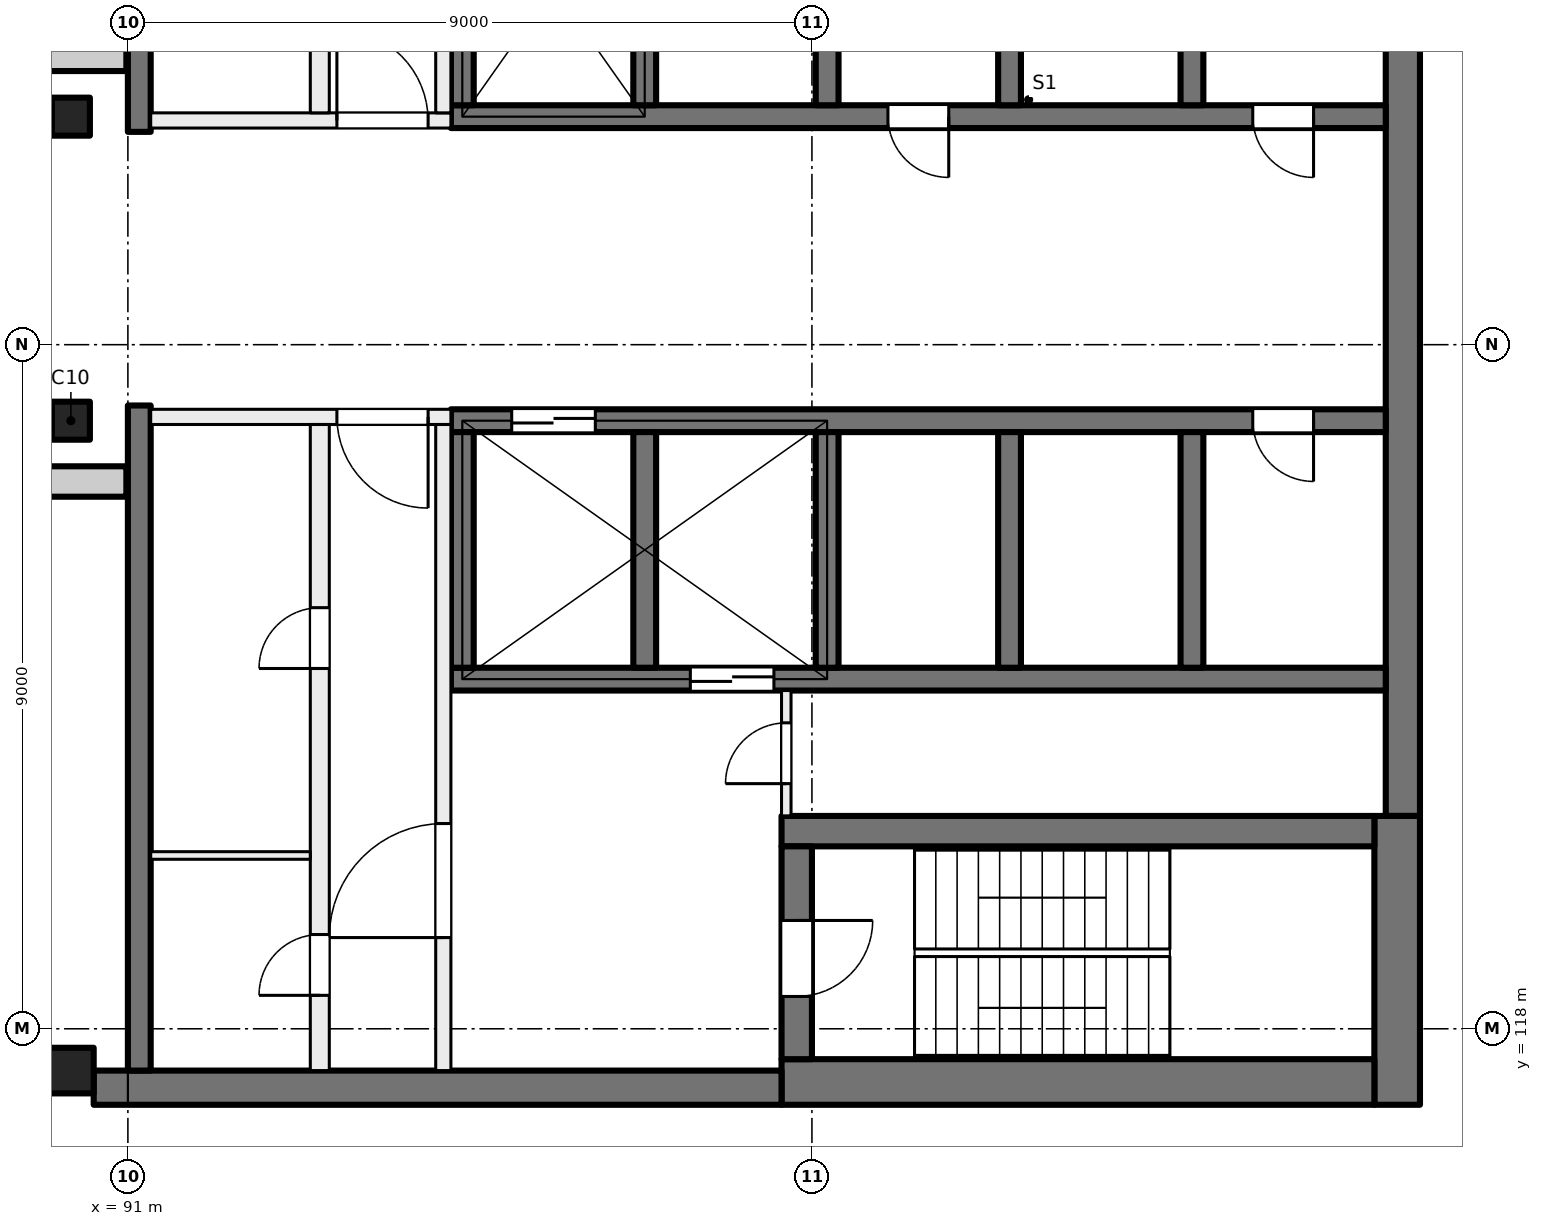
"""IFC4 building model, lengths in metres.
Left out: names, types, materials, properties, quantities, classifications, styles, units other than length and angle.
Written with IfcOpenShell. Run it as: python <this file> out.ifc"""

import sys

from ifc_helpers import new_model, si_unit, direction, frame, frame_2d, origin, origin_2d, place, context, subcontext, project, spatial, rectangle, extrude, element, fill, save


model = new_model("IFC4")
c1 = context("Model", 3, precision=1e-05, world=origin(), true_north=direction((0.0, 1.0)))
c2 = subcontext(c1, "Body", "Model", "MODEL_VIEW")
j1 = project(units=[si_unit("LENGTHUNIT", "METRE"), si_unit("PLANEANGLEUNIT", "RADIAN")], contexts=[c1])
p1 = place(None, origin())
s1 = spatial("IfcSite", under=j1, at=p1, CompositionType="ELEMENT")
p2 = place(p1, origin())
s2 = spatial("IfcBuilding", under=s1, at=p2, CompositionType="ELEMENT")
p3 = place(p2, frame((0.0, 0.0, 291.0)))
s3 = spatial("IfcBuildingStorey", under=s2, at=p3, CompositionType="ELEMENT", Elevation=291.0)
for number, where, z_axis, x_axis in (
    (1, (90.25, 130.0, 0.0), (0.0, 0.0, 1.0), (1.0, 0.0, 0.0)),
    (2, (90.25, 126.0, 0.0), (0.0, 0.0, 1.0), (1.0, 0.0, 0.0)),
):
    element("IfcColumn", number, at=place(p3, frame(where, z_axis=z_axis, x_axis=x_axis)), inside=s3, PredefinedType="COLUMN", context=c2, shape_type="SweptSolid", body=[
        extrude(rectangle(XDim=0.5, YDim=0.5, at=origin_2d()), origin(), (0.0, 0.0, 1.0), 4.5),
    ])
p4 = place(p3, frame((90.25, 117.45, 0.0), z_axis=(0.0, 0.0, 1.0), x_axis=(1.0, 0.0, 0.0)))
e3 = element("IfcColumn", 3, at=p4, inside=s3, PredefinedType="COLUMN", context=c2, shape_type="SweptSolid", body=[
    extrude(rectangle(XDim=0.6, YDim=0.6, at=origin_2d()), origin(), (0.0, 0.0, 1.0), 4.5),
])
p5 = place(p3, frame((107.775, 135.2, 0.0), z_axis=(0.0, 0.0, 1.0), x_axis=(0.0, -1.0, 0.0)))
e4 = element("IfcWall", 4, at=p5, inside=s3, PredefinedType="SHEAR", context=c2, shape_type="SweptSolid", body=[
    extrude(rectangle(XDim=14.4, YDim=0.45, at=frame_2d((7.2, 0.0))), origin(), (0.0, 0.0, 1.0), 4.5),
])
p6 = place(p3, frame((107.7, 120.8, 0.0), z_axis=(0.0, 0.0, 1.0), x_axis=(0.0, -1.0, 0.0)))
e5 = element("IfcWall", 5, at=p6, inside=s3, PredefinedType="SHEAR", context=c2, shape_type="SweptSolid", body=[
    extrude(rectangle(XDim=3.8, YDim=0.6, at=frame_2d((1.9, 0.0))), origin(), (0.0, 0.0, 1.0), 4.5),
])
p7 = place(p3, frame((107.4, 117.3, 0.0), z_axis=(0.0, 0.0, 1.0), x_axis=(-1.0, 0.0, 0.0)))
e6 = element("IfcWall", 6, at=p7, inside=s3, PredefinedType="SHEAR", context=c2, shape_type="SweptSolid", body=[
    extrude(rectangle(XDim=7.8, YDim=0.6, at=frame_2d((3.9, 0.0))), origin(), (0.0, 0.0, 1.0), 4.5),
])
p8 = place(p3, frame((99.6, 117.225, 0.0), z_axis=(0.0, 0.0, 1.0), x_axis=(-1.0, 0.0, 0.0)))
e7 = element("IfcWall", 7, at=p8, inside=s3, PredefinedType="SHEAR", context=c2, shape_type="SweptSolid", body=[
    extrude(rectangle(XDim=9.05, YDim=0.45, at=frame_2d((4.525, 0.0))), origin(), (0.0, 0.0, 1.0), 4.5),
])
p9 = place(p3, frame((107.4, 120.6, 0.0), z_axis=(0.0, 0.0, 1.0), x_axis=(-1.0, 0.0, 0.0)))
e8 = element("IfcWall", 8, at=p9, inside=s3, PredefinedType="SHEAR", context=c2, shape_type="SweptSolid", body=[
    extrude(rectangle(XDim=7.8, YDim=0.4, at=frame_2d((3.9, 0.0))), origin(), (0.0, 0.0, 1.0), 4.5),
])
p10 = place(p3, frame((99.8, 120.4, 0.0), z_axis=(0.0, 0.0, 1.0), x_axis=(0.0, -1.0, 0.0)))
e9 = element("IfcWall", 9, at=p10, inside=s3, PredefinedType="SHEAR", context=c2, shape_type="SweptSolid", body=[
    extrude(rectangle(XDim=2.8, YDim=0.4, at=frame_2d((1.4, 0.0))), origin(), (0.0, 0.0, 1.0), 4.5),
])
p11 = place(p10, frame((0.975, 0.0, 0.0)))
e10 = element("IfcOpeningElement", 10, at=p11, cuts=e9, PredefinedType="OPENING", context=c2, shape_type="SweptSolid", body=[
    extrude(rectangle(XDim=1.0, YDim=2.1, at=frame_2d((0.5, 1.05))), frame((0.0, 0.21, 0.0), z_axis=(0.0, -1.0, 0.0), x_axis=(1.0, 0.0, 0.0)), (0.0, 0.0, 1.0), 0.42),
])
p12 = place(p3, frame((107.55, 130.0, 0.0), z_axis=(0.0, 0.0, 1.0), x_axis=(-1.0, 0.0, 0.0)))
e11 = element("IfcWall", 11, at=p12, inside=s3, PredefinedType="SHEAR", context=c2, shape_type="SweptSolid", body=[
    extrude(rectangle(XDim=12.3, YDim=0.3, at=frame_2d((6.15, 0.0))), origin(), (0.0, 0.0, 1.0), 4.5),
])
p13 = place(p12, frame((0.95, 0.0, 0.0)))
e12 = element("IfcOpeningElement", 12, at=p13, cuts=e11, PredefinedType="OPENING", context=c2, shape_type="SweptSolid", body=[
    extrude(rectangle(XDim=0.8, YDim=2.1, at=frame_2d((0.4, 1.05))), frame((0.0, 0.16, 0.0), z_axis=(0.0, -1.0, 0.0), x_axis=(1.0, 0.0, 0.0)), (0.0, 0.0, 1.0), 0.32),
])
p14 = place(p12, frame((5.75, 0.0, 0.0)))
e13 = element("IfcOpeningElement", 13, at=p14, cuts=e11, PredefinedType="OPENING", context=c2, shape_type="SweptSolid", body=[
    extrude(rectangle(XDim=0.8, YDim=2.1, at=frame_2d((0.4, 1.05))), frame((0.0, 0.16, 0.0), z_axis=(0.0, -1.0, 0.0), x_axis=(1.0, 0.0, 0.0)), (0.0, 0.0, 1.0), 0.32),
])
for number, where, z_axis, x_axis in (
    (14, (105.0, 133.25, 0.0), (0.0, 0.0, 1.0), (0.0, -1.0, 0.0)),
    (15, (102.6, 133.25, 0.0), (0.0, 0.0, 1.0), (0.0, -1.0, 0.0)),
    (16, (100.2, 133.25, 0.0), (0.0, 0.0, 1.0), (0.0, -1.0, 0.0)),
    (17, (97.8, 133.25, 0.0), (0.0, 0.0, 1.0), (0.0, -1.0, 0.0)),
    (18, (95.4, 133.25, 0.0), (0.0, 0.0, 1.0), (0.0, -1.0, 0.0)),
):
    element("IfcWall", number, at=place(p3, frame(where, z_axis=z_axis, x_axis=x_axis)), inside=s3, PredefinedType="SHEAR", context=c2, shape_type="SweptSolid", body=[
        extrude(rectangle(XDim=3.1, YDim=0.3, at=frame_2d((1.55, 0.0))), origin(), (0.0, 0.0, 1.0), 4.5),
    ])
p15 = place(p3, frame((107.55, 126.0, 0.0), z_axis=(0.0, 0.0, 1.0), x_axis=(-1.0, 0.0, 0.0)))
e19 = element("IfcWall", 19, at=p15, inside=s3, PredefinedType="SHEAR", context=c2, shape_type="SweptSolid", body=[
    extrude(rectangle(XDim=12.3, YDim=0.3, at=frame_2d((6.15, 0.0))), origin(), (0.0, 0.0, 1.0), 4.5),
])
p16 = place(p15, frame((10.4, 0.0, 0.0)))
e20 = element("IfcOpeningElement", 20, at=p16, cuts=e19, PredefinedType="OPENING", context=c2, shape_type="SweptSolid", body=[
    extrude(rectangle(XDim=1.1, YDim=2.1, at=frame_2d((0.55, 1.05))), frame((0.0, 0.16, 0.0), z_axis=(0.0, -1.0, 0.0), x_axis=(1.0, 0.0, 0.0)), (0.0, 0.0, 1.0), 0.32),
])
p17 = place(p15, frame((0.95, 0.0, 0.0)))
e21 = element("IfcOpeningElement", 21, at=p17, cuts=e19, PredefinedType="OPENING", context=c2, shape_type="SweptSolid", body=[
    extrude(rectangle(XDim=0.8, YDim=2.1, at=frame_2d((0.4, 1.05))), frame((0.0, 0.16, 0.0), z_axis=(0.0, -1.0, 0.0), x_axis=(1.0, 0.0, 0.0)), (0.0, 0.0, 1.0), 0.32),
])
p18 = place(p3, frame((107.55, 122.6, 0.0), z_axis=(0.0, 0.0, 1.0), x_axis=(-1.0, 0.0, 0.0)))
e22 = element("IfcWall", 22, at=p18, inside=s3, PredefinedType="SHEAR", context=c2, shape_type="SweptSolid", body=[
    extrude(rectangle(XDim=12.3, YDim=0.3, at=frame_2d((6.15, 0.0))), origin(), (0.0, 0.0, 1.0), 4.5),
])
p19 = place(p18, frame((8.05, 0.0, 0.0)))
e23 = element("IfcOpeningElement", 23, at=p19, cuts=e22, PredefinedType="OPENING", context=c2, shape_type="SweptSolid", body=[
    extrude(rectangle(XDim=1.1, YDim=2.1, at=frame_2d((0.55, 1.05))), frame((0.0, 0.16, 0.0), z_axis=(0.0, -1.0, 0.0), x_axis=(1.0, 0.0, 0.0)), (0.0, 0.0, 1.0), 0.32),
])
for number, where, z_axis, x_axis in (
    (24, (105.0, 125.85, 0.0), (0.0, 0.0, 1.0), (0.0, -1.0, 0.0)),
    (25, (102.6, 125.85, 0.0), (0.0, 0.0, 1.0), (0.0, -1.0, 0.0)),
    (26, (100.2, 125.85, 0.0), (0.0, 0.0, 1.0), (0.0, -1.0, 0.0)),
    (27, (97.8, 125.85, 0.0), (0.0, 0.0, 1.0), (0.0, -1.0, 0.0)),
    (28, (95.4, 125.85, 0.0), (0.0, 0.0, 1.0), (0.0, -1.0, 0.0)),
):
    element("IfcWall", number, at=place(p3, frame(where, z_axis=z_axis, x_axis=x_axis)), inside=s3, PredefinedType="SHEAR", context=c2, shape_type="SweptSolid", body=[
        extrude(rectangle(XDim=3.1, YDim=0.3, at=frame_2d((1.55, 0.0))), origin(), (0.0, 0.0, 1.0), 4.5),
    ])
for number, where, z_axis, x_axis in (
    (29, (91.15, 138.55, 0.0), (0.0, 0.0, 1.0), (0.0, -1.0, 0.0)),
    (30, (91.15, 126.2, 0.0), (0.0, 0.0, 1.0), (0.0, -1.0, 0.0)),
):
    element("IfcWall", number, at=place(p3, frame(where, z_axis=z_axis, x_axis=x_axis)), inside=s3, PredefinedType="SHEAR", context=c2, shape_type="SweptSolid", body=[
        extrude(rectangle(XDim=8.75, YDim=0.3, at=frame_2d((4.375, 0.0))), origin(), (0.0, 0.0, 1.0), 4.5),
    ])
p20 = place(p3, frame((90.98, 125.2, 0.0), z_axis=(0.0, 0.0, 1.0), x_axis=(-1.0, 0.0, 0.0)))
e31 = element("IfcWall", 31, at=p20, inside=s3, PredefinedType="SOLIDWALL", context=c2, shape_type="SweptSolid", body=[
    extrude(rectangle(XDim=38.48, YDim=0.4, at=frame_2d((19.24, 0.0))), origin(), (0.0, 0.0, 1.0), 4.125),
])
p21 = place(p3, frame((72.42, 130.8, 0.0), z_axis=(0.0, 0.0, 1.0), x_axis=(1.0, 0.0, 0.0)))
e32 = element("IfcWall", 32, at=p21, inside=s3, PredefinedType="SOLIDWALL", context=c2, shape_type="SweptSolid", body=[
    extrude(rectangle(XDim=18.56, YDim=0.4, at=frame_2d((9.28, 0.0))), origin(), (0.0, 0.0, 1.0), 4.125),
])
p22 = place(p3, frame((95.25, 126.05, 0.0), z_axis=(0.0, 0.0, 1.0), x_axis=(-1.0, 0.0, 0.0)))
e33 = element("IfcWall", 33, at=p22, inside=s3, PredefinedType="PARTITIONING", context=c2, shape_type="SweptSolid", body=[
    extrude(rectangle(XDim=3.95, YDim=0.2, at=frame_2d((1.975, 0.0))), origin(), (0.0, 0.0, 1.0), 4.125),
])
p23 = place(p22, frame((0.3, 0.0, 0.0)))
e34 = element("IfcOpeningElement", 34, at=p23, cuts=e33, PredefinedType="OPENING", context=c2, shape_type="SweptSolid", body=[
    extrude(rectangle(XDim=1.2, YDim=2.1, at=frame_2d((0.6, 1.05))), frame((0.0, 0.11, 0.0), z_axis=(0.0, -1.0, 0.0), x_axis=(1.0, 0.0, 0.0)), (0.0, 0.0, 1.0), 0.22),
])
p24 = place(p3, frame((95.15, 117.45, 0.0), z_axis=(0.0, 0.0, 1.0), x_axis=(0.0, 1.0, 0.0)))
e35 = element("IfcWall", 35, at=p24, inside=s3, PredefinedType="PARTITIONING", context=c2, shape_type="SweptSolid", body=[
    extrude(rectangle(XDim=8.5, YDim=0.2, at=frame_2d((4.25, 0.0))), origin(), (0.0, 0.0, 1.0), 4.125),
])
p25 = place(p24, frame((1.75, 0.0, 0.0)))
e36 = element("IfcOpeningElement", 36, at=p25, cuts=e35, PredefinedType="OPENING", context=c2, shape_type="SweptSolid", body=[
    extrude(rectangle(XDim=1.5, YDim=2.1, at=frame_2d((0.75, 1.05))), frame((0.0, 0.11, 0.0), z_axis=(0.0, -1.0, 0.0), x_axis=(1.0, 0.0, 0.0)), (0.0, 0.0, 1.0), 0.22),
])
p26 = place(p3, frame((93.525, 117.45, 0.0), z_axis=(0.0, 0.0, 1.0), x_axis=(0.0, 1.0, 0.0)))
e37 = element("IfcWall", 37, at=p26, inside=s3, PredefinedType="PARTITIONING", context=c2, shape_type="SweptSolid", body=[
    extrude(rectangle(XDim=8.5, YDim=0.25, at=frame_2d((4.25, 0.0))), origin(), (0.0, 0.0, 1.0), 4.125),
])
p27 = place(p26, frame((5.29, 0.0, 0.0)))
e38 = element("IfcOpeningElement", 38, at=p27, cuts=e37, PredefinedType="OPENING", context=c2, shape_type="SweptSolid", body=[
    extrude(rectangle(XDim=0.8, YDim=2.1, at=frame_2d((0.4, 1.05))), frame((0.0, 0.135, 0.0), z_axis=(0.0, -1.0, 0.0), x_axis=(1.0, 0.0, 0.0)), (0.0, 0.0, 1.0), 0.27),
])
p28 = place(p26, frame((0.99, 0.0, 0.0)))
e39 = element("IfcOpeningElement", 39, at=p28, cuts=e37, PredefinedType="OPENING", context=c2, shape_type="SweptSolid", body=[
    extrude(rectangle(XDim=0.8, YDim=2.1, at=frame_2d((0.4, 1.05))), frame((0.0, 0.135, 0.0), z_axis=(0.0, -1.0, 0.0), x_axis=(1.0, 0.0, 0.0)), (0.0, 0.0, 1.0), 0.27),
])
p29 = place(p3, frame((99.663, 120.8, 0.0), z_axis=(0.0, 0.0, 1.0), x_axis=(0.0, 1.0, 0.0)))
e40 = element("IfcWall", 40, at=p29, inside=s3, PredefinedType="PARTITIONING", context=c2, shape_type="SweptSolid", body=[
    extrude(rectangle(XDim=1.65, YDim=0.125, at=frame_2d((0.825, 0.0))), origin(), (0.0, 0.0, 1.0), 4.125),
])
p30 = place(p29, frame((0.425, 0.0, 0.0)))
e41 = element("IfcOpeningElement", 41, at=p30, cuts=e40, PredefinedType="OPENING", context=c2, shape_type="SweptSolid", body=[
    extrude(rectangle(XDim=0.8, YDim=2.1, at=frame_2d((0.4, 1.05))), frame((0.0, 0.073, 0.0), z_axis=(0.0, -1.0, 0.0), x_axis=(1.0, 0.0, 0.0)), (0.0, 0.0, 1.0), 0.145),
])
p31 = place(p3, frame((93.4, 120.28, 0.0), z_axis=(0.0, 0.0, 1.0), x_axis=(-1.0, 0.0, 0.0)))
e42 = element("IfcWall", 42, at=p31, inside=s3, PredefinedType="PARTITIONING", context=c2, shape_type="SweptSolid", body=[
    extrude(rectangle(XDim=2.1, YDim=0.1, at=frame_2d((1.05, 0.0))), origin(), (0.0, 0.0, 1.0), 4.125),
])
p32 = place(p3, frame((91.3, 129.95, 0.0), z_axis=(0.0, 0.0, 1.0), x_axis=(1.0, 0.0, 0.0)))
e43 = element("IfcWall", 43, at=p32, inside=s3, PredefinedType="PARTITIONING", context=c2, shape_type="SweptSolid", body=[
    extrude(rectangle(XDim=3.95, YDim=0.2, at=frame_2d((1.975, 0.0))), origin(), (0.0, 0.0, 1.0), 4.125),
])
p33 = place(p32, frame((2.45, 0.0, 0.0)))
e44 = element("IfcOpeningElement", 44, at=p33, cuts=e43, PredefinedType="OPENING", context=c2, shape_type="SweptSolid", body=[
    extrude(rectangle(XDim=1.2, YDim=2.1, at=frame_2d((0.6, 1.05))), frame((0.0, 0.11, 0.0), z_axis=(0.0, -1.0, 0.0), x_axis=(1.0, 0.0, 0.0)), (0.0, 0.0, 1.0), 0.22),
])
p34 = place(p3, frame((95.15, 130.05, 0.0), z_axis=(0.0, 0.0, 1.0), x_axis=(0.0, 1.0, 0.0)))
e45 = element("IfcWall", 45, at=p34, inside=s3, PredefinedType="PARTITIONING", context=c2, shape_type="SweptSolid", body=[
    extrude(rectangle(XDim=8.5, YDim=0.2, at=frame_2d((4.25, 0.0))), origin(), (0.0, 0.0, 1.0), 4.125),
])
p35 = place(p34, frame((5.25, 0.0, 0.0)))
e46 = element("IfcOpeningElement", 46, at=p35, cuts=e45, PredefinedType="OPENING", context=c2, shape_type="SweptSolid", body=[
    extrude(rectangle(XDim=1.5, YDim=2.1, at=frame_2d((0.75, 1.05))), frame((0.0, 0.11, 0.0), z_axis=(0.0, -1.0, 0.0), x_axis=(1.0, 0.0, 0.0)), (0.0, 0.0, 1.0), 0.22),
])
p36 = place(p3, frame((93.525, 130.05, 0.0), z_axis=(0.0, 0.0, 1.0), x_axis=(0.0, 1.0, 0.0)))
e47 = element("IfcWall", 47, at=p36, inside=s3, PredefinedType="PARTITIONING", context=c2, shape_type="SweptSolid", body=[
    extrude(rectangle(XDim=8.5, YDim=0.25, at=frame_2d((4.25, 0.0))), origin(), (0.0, 0.0, 1.0), 4.125),
])
p37 = place(p36, frame((1.6, 0.0, 0.0)))
e48 = element("IfcOpeningElement", 48, at=p37, cuts=e47, PredefinedType="OPENING", context=c2, shape_type="SweptSolid", body=[
    extrude(rectangle(XDim=1.0, YDim=2.1, at=frame_2d((0.5, 1.05))), frame((0.0, 0.135, 0.0), z_axis=(0.0, -1.0, 0.0), x_axis=(1.0, 0.0, 0.0)), (0.0, 0.0, 1.0), 0.27),
])
p38 = place(p36, frame((5.9, 0.0, 0.0)))
e49 = element("IfcOpeningElement", 49, at=p38, cuts=e47, PredefinedType="OPENING", context=c2, shape_type="SweptSolid", body=[
    extrude(rectangle(XDim=1.0, YDim=2.1, at=frame_2d((0.5, 1.05))), frame((0.0, 0.135, 0.0), z_axis=(0.0, -1.0, 0.0), x_axis=(1.0, 0.0, 0.0)), (0.0, 0.0, 1.0), 0.27),
])
p39 = place(p16, origin())
e50 = element("IfcDoor", 50, at=p39, inside=s3, OperationType="DOUBLE_DOOR_SLIDING", PredefinedType="DOOR", context=c2, shape_type="SweptSolid", body=[
    extrude(rectangle(XDim=1.1, YDim=2.1, at=frame_2d((0.55, 1.05))), frame((0.0, 0.025, 0.0), z_axis=(0.0, -1.0, 0.0), x_axis=(1.0, 0.0, 0.0)), (0.0, 0.0, 1.0), 0.05),
])
fill(e20, e50)
p40 = place(p17, origin())
e51 = element("IfcDoor", 51, at=p40, inside=s3, OperationType="SINGLE_SWING_LEFT", PredefinedType="DOOR", context=c2, shape_type="SweptSolid", body=[
    extrude(rectangle(XDim=0.8, YDim=2.1, at=frame_2d((0.4, 1.05))), frame((0.0, 0.025, 0.0), z_axis=(0.0, -1.0, 0.0), x_axis=(1.0, 0.0, 0.0)), (0.0, 0.0, 1.0), 0.05),
])
fill(e21, e51)
p41 = place(p13, origin())
e52 = element("IfcDoor", 52, at=p41, inside=s3, OperationType="SINGLE_SWING_RIGHT", PredefinedType="DOOR", context=c2, shape_type="SweptSolid", body=[
    extrude(rectangle(XDim=0.8, YDim=2.1, at=frame_2d((0.4, 1.05))), frame((0.0, 0.025, 0.0), z_axis=(0.0, -1.0, 0.0), x_axis=(1.0, 0.0, 0.0)), (0.0, 0.0, 1.0), 0.05),
])
fill(e12, e52)
p42 = place(p14, origin())
e53 = element("IfcDoor", 53, at=p42, inside=s3, OperationType="SINGLE_SWING_LEFT", PredefinedType="DOOR", context=c2, shape_type="SweptSolid", body=[
    extrude(rectangle(XDim=0.8, YDim=2.1, at=frame_2d((0.4, 1.05))), frame((0.0, 0.025, 0.0), z_axis=(0.0, -1.0, 0.0), x_axis=(1.0, 0.0, 0.0)), (0.0, 0.0, 1.0), 0.05),
])
fill(e13, e53)
p43 = place(p23, origin())
e54 = element("IfcDoor", 54, at=p43, inside=s3, OperationType="DOUBLE_DOOR_SINGLE_SWING", PredefinedType="DOOR", context=c2, shape_type="SweptSolid", body=[
    extrude(rectangle(XDim=1.2, YDim=2.1, at=frame_2d((0.6, 1.05))), frame((0.0, 0.025, 0.0), z_axis=(0.0, -1.0, 0.0), x_axis=(1.0, 0.0, 0.0)), (0.0, 0.0, 1.0), 0.05),
])
fill(e34, e54)
p44 = place(p25, origin())
e55 = element("IfcDoor", 55, at=p44, inside=s3, OperationType="DOUBLE_DOOR_SINGLE_SWING", PredefinedType="DOOR", context=c2, shape_type="SweptSolid", body=[
    extrude(rectangle(XDim=1.5, YDim=2.1, at=frame_2d((0.75, 1.05))), frame((0.0, 0.025, 0.0), z_axis=(0.0, -1.0, 0.0), x_axis=(1.0, 0.0, 0.0)), (0.0, 0.0, 1.0), 0.05),
])
fill(e36, e55)
p45 = place(p11, origin())
e56 = element("IfcDoor", 56, at=p45, inside=s3, OperationType="SINGLE_SWING_LEFT", PredefinedType="DOOR", context=c2, shape_type="SweptSolid", body=[
    extrude(rectangle(XDim=1.0, YDim=2.1, at=frame_2d((0.5, 1.05))), frame((0.0, 0.025, 0.0), z_axis=(0.0, -1.0, 0.0), x_axis=(1.0, 0.0, 0.0)), (0.0, 0.0, 1.0), 0.05),
])
fill(e10, e56)
p46 = place(p30, origin())
e57 = element("IfcDoor", 57, at=p46, inside=s3, OperationType="SINGLE_SWING_RIGHT", PredefinedType="DOOR", context=c2, shape_type="SweptSolid", body=[
    extrude(rectangle(XDim=0.8, YDim=2.1, at=frame_2d((0.4, 1.05))), frame((0.0, 0.025, 0.0), z_axis=(0.0, -1.0, 0.0), x_axis=(1.0, 0.0, 0.0)), (0.0, 0.0, 1.0), 0.05),
])
fill(e41, e57)
p47 = place(p27, origin())
e58 = element("IfcDoor", 58, at=p47, inside=s3, OperationType="SINGLE_SWING_LEFT", PredefinedType="DOOR", context=c2, shape_type="SweptSolid", body=[
    extrude(rectangle(XDim=0.8, YDim=2.1, at=frame_2d((0.4, 1.05))), frame((0.0, 0.025, 0.0), z_axis=(0.0, -1.0, 0.0), x_axis=(1.0, 0.0, 0.0)), (0.0, 0.0, 1.0), 0.05),
])
fill(e38, e58)
p48 = place(p28, origin())
e59 = element("IfcDoor", 59, at=p48, inside=s3, OperationType="SINGLE_SWING_RIGHT", PredefinedType="DOOR", context=c2, shape_type="SweptSolid", body=[
    extrude(rectangle(XDim=0.8, YDim=2.1, at=frame_2d((0.4, 1.05))), frame((0.0, 0.025, 0.0), z_axis=(0.0, -1.0, 0.0), x_axis=(1.0, 0.0, 0.0)), (0.0, 0.0, 1.0), 0.05),
])
fill(e39, e59)
p49 = place(p33, origin())
e60 = element("IfcDoor", 60, at=p49, inside=s3, OperationType="DOUBLE_DOOR_SINGLE_SWING", PredefinedType="DOOR", context=c2, shape_type="SweptSolid", body=[
    extrude(rectangle(XDim=1.2, YDim=2.1, at=frame_2d((0.6, 1.05))), frame((0.0, 0.025, 0.0), z_axis=(0.0, -1.0, 0.0), x_axis=(1.0, 0.0, 0.0)), (0.0, 0.0, 1.0), 0.05),
])
fill(e44, e60)
p50 = place(p19, origin())
e61 = element("IfcDoor", 61, at=p50, inside=s3, OperationType="DOUBLE_DOOR_SLIDING", PredefinedType="DOOR", context=c2, shape_type="SweptSolid", body=[
    extrude(rectangle(XDim=1.1, YDim=2.1, at=frame_2d((0.55, 1.05))), frame((0.0, 0.025, 0.0), z_axis=(0.0, -1.0, 0.0), x_axis=(1.0, 0.0, 0.0)), (0.0, 0.0, 1.0), 0.05),
])
fill(e23, e61)
save(model, sys.argv[1])
